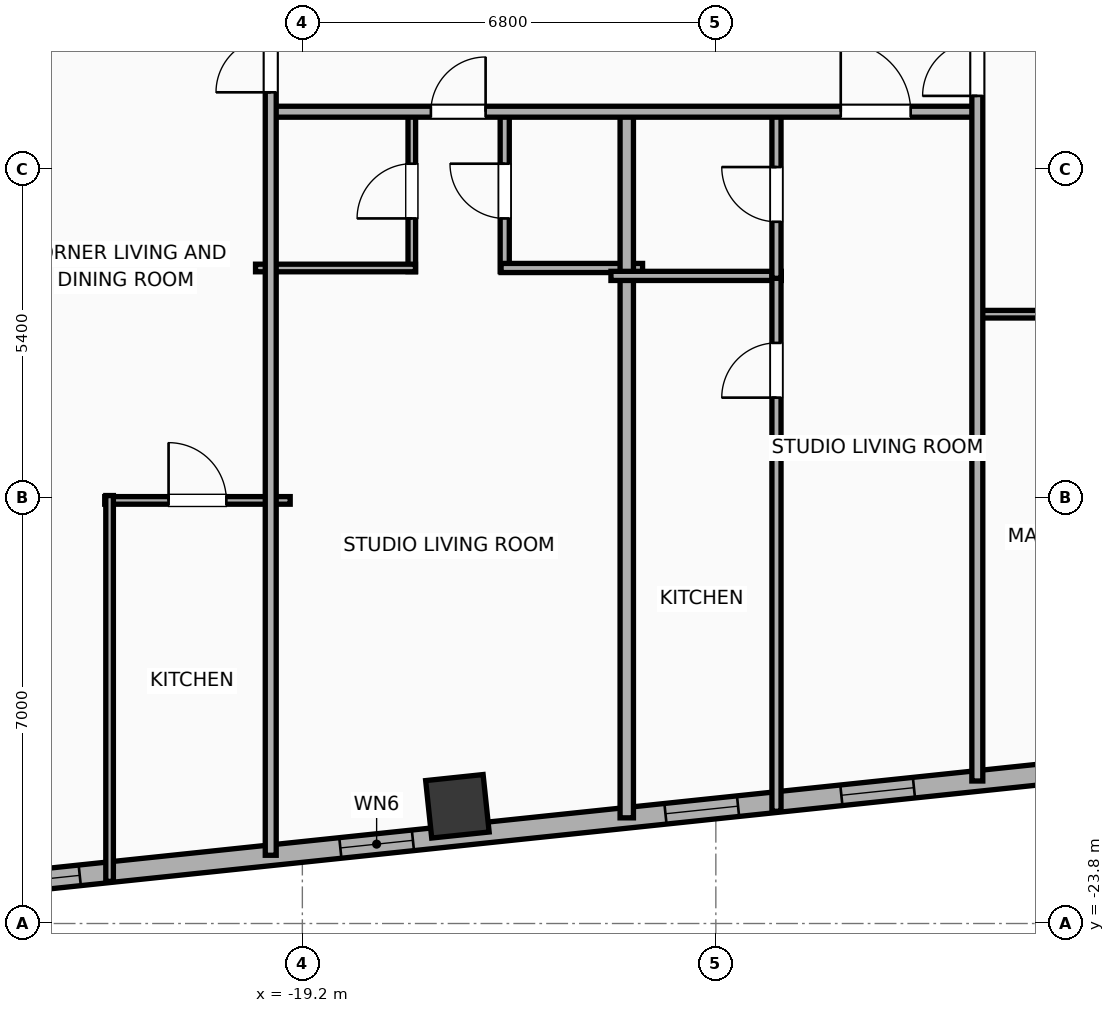
"""IFC4 building model, lengths in metres.
Left out: names, types, materials, properties, quantities, classifications, styles, units other than length and angle.
Written with IfcOpenShell. Run it as: python <this file> out.ifc"""

import sys

from ifc_helpers import new_model, si_unit, direction, frame, frame_2d, origin, origin_2d, place, context, subcontext, project, spatial, rectangle, hollow_rectangle, extrude, element, fill, save


model = new_model("IFC4")
c1 = context("Model", 3, precision=1e-05, world=origin(), true_north=direction((0.0, 1.0)))
c2 = subcontext(c1, "Body", "Model", "MODEL_VIEW")
j1 = project(units=[si_unit("LENGTHUNIT", "METRE"), si_unit("PLANEANGLEUNIT", "RADIAN")], contexts=[c1])
p1 = place(None, origin())
s1 = spatial("IfcSite", under=j1, at=p1, CompositionType="ELEMENT")
p2 = place(p1, origin())
s2 = spatial("IfcBuilding", under=s1, at=p2, CompositionType="ELEMENT")
p3 = place(p2, frame((0.0, 0.0, 163.8)))
s3 = spatial("IfcBuildingStorey", under=s2, at=p3, CompositionType="ELEMENT", Elevation=163.8)
p4 = place(p3, frame((-16.65, -21.873, 0.0), z_axis=(0.0, 0.0, 1.0), x_axis=(0.994521895368, 0.104528463268, 0.0)))
e1 = element("IfcColumn", 1, at=p4, inside=s3, PredefinedType="COLUMN", context=c2, shape_type="SweptSolid", body=[
    extrude(hollow_rectangle(XDim=0.95, YDim=0.95, WallThickness=0.032, at=origin_2d()), origin(), (0.0, 0.0, 1.0), 3.9),
])
p5 = place(p3, frame((24.756, -18.003, 0.0), z_axis=(0.0, 0.0, 1.0), x_axis=(-0.99452160744, -0.104531202687, 0.0)))
e2 = element("IfcWall", 2, at=p5, inside=s3, PredefinedType="ELEMENTEDWALL", context=c2, shape_type="SweptSolid", body=[
    extrude(rectangle(XDim=51.967, YDim=0.34, at=frame_2d((25.983, 0.0))), origin(), (0.0, 0.0, 1.0), 3.65),
])
p6 = place(p5, frame((25.633, 0.0, 0.75)))
e3 = element("IfcOpeningElement", 3, at=p6, cuts=e2, PredefinedType="OPENING", context=c2, shape_type="SweptSolid", body=[
    extrude(rectangle(XDim=2.4, YDim=2.1, at=frame_2d((1.2, 1.05))), frame((0.0, 0.18, 0.0), z_axis=(0.0, -1.0, 0.0), x_axis=(1.0, 0.0, 0.0)), (0.0, 0.0, 1.0), 0.36),
])
p7 = place(p5, frame((42.369, 0.0, 0.75)))
e4 = element("IfcOpeningElement", 4, at=p7, cuts=e2, PredefinedType="OPENING", context=c2, shape_type="SweptSolid", body=[
    extrude(rectangle(XDim=1.2, YDim=2.05, at=frame_2d((0.6, 1.025))), frame((0.0, 0.18, 0.0), z_axis=(0.0, -1.0, 0.0), x_axis=(1.0, 0.0, 0.0)), (0.0, 0.0, 1.0), 0.36),
])
p8 = place(p5, frame((34.085, 0.0, 0.75)))
e5 = element("IfcOpeningElement", 5, at=p8, cuts=e2, PredefinedType="OPENING", context=c2, shape_type="SweptSolid", body=[
    extrude(rectangle(XDim=1.2, YDim=2.05, at=frame_2d((0.6, 1.025))), frame((0.0, 0.18, 0.0), z_axis=(0.0, -1.0, 0.0), x_axis=(1.0, 0.0, 0.0)), (0.0, 0.0, 1.0), 0.36),
])
p9 = place(p5, frame((36.993, 0.0, 0.75)))
e6 = element("IfcOpeningElement", 6, at=p9, cuts=e2, PredefinedType="OPENING", context=c2, shape_type="SweptSolid", body=[
    extrude(rectangle(XDim=1.2, YDim=2.05, at=frame_2d((0.6, 1.025))), frame((0.0, 0.18, 0.0), z_axis=(0.0, -1.0, 0.0), x_axis=(1.0, 0.0, 0.0)), (0.0, 0.0, 1.0), 0.36),
])
p10 = place(p5, frame((14.397, 0.0, 0.75)))
e7 = element("IfcOpeningElement", 7, at=p10, cuts=e2, PredefinedType="OPENING", context=c2, shape_type="SweptSolid", body=[
    extrude(rectangle(XDim=1.2, YDim=2.05, at=frame_2d((0.6, 1.025))), frame((0.0, 0.18, 0.0), z_axis=(0.0, -1.0, 0.0), x_axis=(1.0, 0.0, 0.0)), (0.0, 0.0, 1.0), 0.36),
])
p11 = place(p5, frame((11.489, 0.0, 0.75)))
e8 = element("IfcOpeningElement", 8, at=p11, cuts=e2, PredefinedType="OPENING", context=c2, shape_type="SweptSolid", body=[
    extrude(rectangle(XDim=1.2, YDim=2.05, at=frame_2d((0.6, 1.025))), frame((0.0, 0.18, 0.0), z_axis=(0.0, -1.0, 0.0), x_axis=(1.0, 0.0, 0.0)), (0.0, 0.0, 1.0), 0.36),
])
p12 = place(p5, frame((8.521, 0.0, 0.75)))
e9 = element("IfcOpeningElement", 9, at=p12, cuts=e2, PredefinedType="OPENING", context=c2, shape_type="SweptSolid", body=[
    extrude(rectangle(XDim=1.2, YDim=2.05, at=frame_2d((0.6, 1.025))), frame((0.0, 0.18, 0.0), z_axis=(0.0, -1.0, 0.0), x_axis=(1.0, 0.0, 0.0)), (0.0, 0.0, 1.0), 0.36),
])
p13 = place(p5, frame((5.582, 0.0, 0.75)))
e10 = element("IfcOpeningElement", 10, at=p13, cuts=e2, PredefinedType="OPENING", context=c2, shape_type="SweptSolid", body=[
    extrude(rectangle(XDim=1.2, YDim=2.05, at=frame_2d((0.6, 1.025))), frame((0.0, 0.18, 0.0), z_axis=(0.0, -1.0, 0.0), x_axis=(1.0, 0.0, 0.0)), (0.0, 0.0, 1.0), 0.36),
])
p14 = place(p5, frame((29.313, 0.0, 0.75)))
e11 = element("IfcOpeningElement", 11, at=p14, cuts=e2, PredefinedType="OPENING", context=c2, shape_type="SweptSolid", body=[
    extrude(rectangle(XDim=1.2, YDim=2.05, at=frame_2d((0.6, 1.025))), frame((0.0, 0.18, 0.0), z_axis=(0.0, -1.0, 0.0), x_axis=(1.0, 0.0, 0.0)), (0.0, 0.0, 1.0), 0.36),
])
p15 = place(p5, frame((22.248, 0.0, 0.75)))
e12 = element("IfcOpeningElement", 12, at=p15, cuts=e2, PredefinedType="OPENING", context=c2, shape_type="SweptSolid", body=[
    extrude(rectangle(XDim=1.2, YDim=2.05, at=frame_2d((0.6, 1.025))), frame((0.0, 0.18, 0.0), z_axis=(0.0, -1.0, 0.0), x_axis=(1.0, 0.0, 0.0)), (0.0, 0.0, 1.0), 0.36),
])
p16 = place(p5, frame((18.186, 0.0, 0.75)))
e13 = element("IfcOpeningElement", 13, at=p16, cuts=e2, PredefinedType="OPENING", context=c2, shape_type="SweptSolid", body=[
    extrude(rectangle(XDim=1.2, YDim=2.05, at=frame_2d((0.6, 1.025))), frame((0.0, 0.18, 0.0), z_axis=(0.0, -1.0, 0.0), x_axis=(1.0, 0.0, 0.0)), (0.0, 0.0, 1.0), 0.36),
])
p17 = place(p5, frame((47.879, 0.0, 0.75)))
e14 = element("IfcOpeningElement", 14, at=p17, cuts=e2, PredefinedType="OPENING", context=c2, shape_type="SweptSolid", body=[
    extrude(rectangle(XDim=1.2, YDim=2.05, at=frame_2d((0.6, 1.025))), frame((0.0, 0.18, 0.0), z_axis=(0.0, -1.0, 0.0), x_axis=(1.0, 0.0, 0.0)), (0.0, 0.0, 1.0), 0.36),
])
p18 = place(p5, frame((49.844, 0.0, 0.75)))
e15 = element("IfcOpeningElement", 15, at=p18, cuts=e2, PredefinedType="OPENING", context=c2, shape_type="SweptSolid", body=[
    extrude(rectangle(XDim=1.2, YDim=2.05, at=frame_2d((0.6, 1.025))), frame((0.0, 0.18, 0.0), z_axis=(0.0, -1.0, 0.0), x_axis=(1.0, 0.0, 0.0)), (0.0, 0.0, 1.0), 0.36),
])
p19 = place(p3, frame((-17.4, -13.08, 0.0), z_axis=(0.0, 0.0, 1.0), x_axis=(0.0, 1.0, 0.0)))
e16 = element("IfcWall", 16, at=p19, inside=s3, PredefinedType="PARTITIONING", context=c2, shape_type="SweptSolid", body=[
    extrude(rectangle(XDim=2.65, YDim=0.125, at=frame_2d((1.325, 0.0))), origin(), (0.0, 0.0, 1.0), 3.65),
])
p20 = place(p19, frame((0.875, 0.0, 0.0)))
e17 = element("IfcOpeningElement", 17, at=p20, cuts=e16, PredefinedType="OPENING", context=c2, shape_type="SweptSolid", body=[
    extrude(rectangle(XDim=0.9, YDim=2.05, at=frame_2d((0.45, 1.025))), frame((0.0, 0.073, 0.0), z_axis=(0.0, -1.0, 0.0), x_axis=(1.0, 0.0, 0.0)), (0.0, 0.0, 1.0), 0.145),
])
p21 = place(p3, frame((-15.872, -13.08, 0.0), z_axis=(0.0, 0.0, 1.0), x_axis=(0.0, 1.0, 0.0)))
e18 = element("IfcWall", 18, at=p21, inside=s3, PredefinedType="PLUMBINGWALL", context=c2, shape_type="SweptSolid", body=[
    extrude(rectangle(XDim=2.65, YDim=0.15, at=frame_2d((1.325, 0.0))), origin(), (0.0, 0.0, 1.0), 3.04),
])
p22 = place(p21, frame((0.875, 0.0, 0.0)))
e19 = element("IfcOpeningElement", 19, at=p22, cuts=e18, PredefinedType="OPENING", context=c2, shape_type="SweptSolid", body=[
    extrude(rectangle(XDim=0.9, YDim=2.05, at=frame_2d((0.45, 1.025))), frame((0.0, 0.085, 0.0), z_axis=(0.0, -1.0, 0.0), x_axis=(1.0, 0.0, 0.0)), (0.0, 0.0, 1.0), 0.17),
])
p23 = place(p3, frame((-19.97, -13.02, 0.0), z_axis=(0.0, 0.0, 1.0), x_axis=(1.0, 0.0, 0.0)))
e20 = element("IfcWall", 20, at=p23, inside=s3, PredefinedType="PARTITIONING", context=c2, shape_type="SweptSolid", body=[
    extrude(rectangle(XDim=2.63, YDim=0.125, at=frame_2d((1.315, 0.0))), origin(), (0.0, 0.0, 1.0), 3.65),
])
p24 = place(p3, frame((-15.932, -13.02, 0.0), z_axis=(0.0, 0.0, 1.0), x_axis=(1.0, 0.0, 0.0)))
e21 = element("IfcWall", 21, at=p24, inside=s3, PredefinedType="PLUMBINGWALL", context=c2, shape_type="SweptSolid", body=[
    extrude(rectangle(XDim=2.327, YDim=0.15, at=frame_2d((1.164, 0.0))), origin(), (0.0, 0.0, 1.0), 3.65),
])
p25 = place(p3, frame((-13.865, -22.062, 0.0), z_axis=(0.0, 0.0, 1.0), x_axis=(0.0, 1.0, 0.0)))
e22 = element("IfcWall", 22, at=p25, inside=s3, PredefinedType="PARTITIONING", context=c2, shape_type="SweptSolid", body=[
    extrude(rectangle(XDim=11.692, YDim=0.22, at=frame_2d((5.846, 0.0))), origin(), (0.0, 0.0, 1.0), 3.65),
])
p26 = place(p3, frame((-14.125, -13.15, 0.0), z_axis=(0.0, 0.0, 1.0), x_axis=(1.0, 0.0, 0.0)))
e23 = element("IfcWall", 23, at=p26, inside=s3, PredefinedType="PLUMBINGWALL", context=c2, shape_type="SweptSolid", body=[
    extrude(rectangle(XDim=2.802, YDim=0.15, at=frame_2d((1.401, 0.0))), origin(), (0.0, 0.0, 1.0), 3.65),
])
p27 = place(p3, frame((-11.403, -21.954, 0.0), z_axis=(0.0, 0.0, 1.0), x_axis=(0.0, 1.0, 0.0)))
e24 = element("IfcWall", 24, at=p27, inside=s3, PredefinedType="PLUMBINGWALL", context=c2, shape_type="SweptSolid", body=[
    extrude(rectangle(XDim=8.844, YDim=0.15, at=frame_2d((4.422, 0.0))), origin(), (0.0, 0.0, 1.0), 3.65),
])
p28 = place(p27, frame((6.802, 0.0, 0.0)))
e25 = element("IfcOpeningElement", 25, at=p28, cuts=e24, PredefinedType="OPENING", context=c2, shape_type="SweptSolid", body=[
    extrude(rectangle(XDim=0.9, YDim=2.05, at=frame_2d((0.45, 1.025))), frame((0.0, 0.085, 0.0), z_axis=(0.0, -1.0, 0.0), x_axis=(1.0, 0.0, 0.0)), (0.0, 0.0, 1.0), 0.17),
])
p29 = place(p3, frame((-11.403, -13.19, 0.0), z_axis=(0.0, 0.0, 1.0), x_axis=(0.0, 1.0, 0.0)))
e26 = element("IfcWall", 26, at=p29, inside=s3, PredefinedType="PLUMBINGWALL", context=c2, shape_type="SweptSolid", body=[
    extrude(rectangle(XDim=2.76, YDim=0.15, at=frame_2d((1.38, 0.0))), origin(), (0.0, 0.0, 1.0), 3.65),
])
p30 = place(p29, frame((0.93, 0.0, 0.0)))
e27 = element("IfcOpeningElement", 27, at=p30, cuts=e26, PredefinedType="OPENING", context=c2, shape_type="SweptSolid", body=[
    extrude(rectangle(XDim=0.9, YDim=2.05, at=frame_2d((0.45, 1.025))), frame((0.0, 0.085, 0.0), z_axis=(0.0, -1.0, 0.0), x_axis=(1.0, 0.0, 0.0)), (0.0, 0.0, 1.0), 0.17),
])
p31 = place(p3, frame((-19.75, -10.45, 0.0), z_axis=(0.0, 0.0, 1.0), x_axis=(1.0, 0.0, 0.0)))
e28 = element("IfcWall", 28, at=p31, inside=s3, PredefinedType="PARTITIONING", context=c2, shape_type="SweptSolid", body=[
    extrude(rectangle(XDim=11.67, YDim=0.18, at=frame_2d((5.835, 0.0))), origin(), (0.0, 0.0, 1.0), 3.65),
])
p32 = place(p31, frame((2.664, 0.0, 0.0)))
e29 = element("IfcOpeningElement", 29, at=p32, cuts=e28, PredefinedType="OPENING", context=c2, shape_type="SweptSolid", body=[
    extrude(rectangle(XDim=0.9, YDim=2.05, at=frame_2d((0.45, 1.025))), frame((0.0, 0.1, 0.0), z_axis=(0.0, -1.0, 0.0), x_axis=(1.0, 0.0, 0.0)), (0.0, 0.0, 1.0), 0.2),
])
p33 = place(p31, frame((9.404, 0.0, 0.0)))
e30 = element("IfcOpeningElement", 30, at=p33, cuts=e28, PredefinedType="OPENING", context=c2, shape_type="SweptSolid", body=[
    extrude(rectangle(XDim=1.15, YDim=2.05, at=frame_2d((0.575, 1.025))), frame((0.0, 0.1, 0.0), z_axis=(0.0, -1.0, 0.0), x_axis=(1.0, 0.0, 0.0)), (0.0, 0.0, 1.0), 0.2),
])
p34 = place(p3, frame((-8.08, -13.78, 0.0), z_axis=(0.0, 0.0, 1.0), x_axis=(1.0, 0.0, 0.0)))
e31 = element("IfcWall", 31, at=p34, inside=s3, PredefinedType="PARTITIONING", context=c2, shape_type="SweptSolid", body=[
    extrude(rectangle(XDim=8.06, YDim=0.125, at=frame_2d((4.03, 0.0))), origin(), (0.0, 0.0, 1.0), 3.65),
])
p35 = place(p34, frame((1.323, 0.0, 0.0)))
e32 = element("IfcOpeningElement", 32, at=p35, cuts=e31, PredefinedType="OPENING", context=c2, shape_type="SweptSolid", body=[
    extrude(rectangle(XDim=0.9, YDim=2.05, at=frame_2d((0.45, 1.025))), frame((0.0, 0.073, 0.0), z_axis=(0.0, -1.0, 0.0), x_axis=(1.0, 0.0, 0.0)), (0.0, 0.0, 1.0), 0.145),
])
p36 = place(p34, frame((4.547, 0.0, 0.0)))
e33 = element("IfcOpeningElement", 33, at=p36, cuts=e31, PredefinedType="OPENING", context=c2, shape_type="SweptSolid", body=[
    extrude(rectangle(XDim=0.9, YDim=2.05, at=frame_2d((0.45, 1.025))), frame((0.0, 0.073, 0.0), z_axis=(0.0, -1.0, 0.0), x_axis=(1.0, 0.0, 0.0)), (0.0, 0.0, 1.0), 0.145),
])
p37 = place(p3, frame((-8.1, -21.456, 0.0), z_axis=(0.0, 0.0, 1.0), x_axis=(0.0, 1.0, 0.0)))
e34 = element("IfcWall", 34, at=p37, inside=s3, PredefinedType="PARTITIONING", context=c2, shape_type="SweptSolid", body=[
    extrude(rectangle(XDim=12.516, YDim=0.18, at=frame_2d((6.258, 0.0))), origin(), (0.0, 0.0, 1.0), 3.65),
])
p38 = place(p37, frame((11.267, 0.0, 0.0)))
e35 = element("IfcOpeningElement", 35, at=p38, cuts=e34, PredefinedType="OPENING", context=c2, shape_type="SweptSolid", body=[
    extrude(rectangle(XDim=0.9, YDim=2.05, at=frame_2d((0.45, 1.025))), frame((0.0, 0.1, 0.0), z_axis=(0.0, -1.0, 0.0), x_axis=(1.0, 0.0, 0.0)), (0.0, 0.0, 1.0), 0.2),
])
p39 = place(p3, frame((-22.45, -16.842, 0.0), z_axis=(0.0, 0.0, 1.0), x_axis=(1.0, 0.0, 0.0)))
e36 = element("IfcWall", 36, at=p39, inside=s3, PredefinedType="PARTITIONING", context=c2, shape_type="SweptSolid", body=[
    extrude(rectangle(XDim=3.05, YDim=0.125, at=frame_2d((1.525, 0.0))), origin(), (0.0, 0.0, 1.0), 3.65),
])
p40 = place(p39, frame((1.05, 0.0, 0.0)))
e37 = element("IfcOpeningElement", 37, at=p40, cuts=e36, PredefinedType="OPENING", context=c2, shape_type="SweptSolid", body=[
    extrude(rectangle(XDim=0.95, YDim=2.05, at=frame_2d((0.475, 1.025))), frame((0.0, 0.073, 0.0), z_axis=(0.0, -1.0, 0.0), x_axis=(1.0, 0.0, 0.0)), (0.0, 0.0, 1.0), 0.145),
])
p41 = place(p3, frame((-22.37, -23.107, 0.0), z_axis=(0.0, 0.0, 1.0), x_axis=(0.0, 1.0, 0.0)))
e38 = element("IfcWall", 38, at=p41, inside=s3, PredefinedType="PARTITIONING", context=c2, shape_type="SweptSolid", body=[
    extrude(rectangle(XDim=6.345, YDim=0.125, at=frame_2d((3.173, 0.0))), origin(), (0.0, 0.0, 1.0), 3.65),
])
p42 = place(p3, frame((-19.72, -22.678, 0.0), z_axis=(0.0, 0.0, 1.0), x_axis=(0.0, 1.0, 0.0)))
e39 = element("IfcWall", 39, at=p42, inside=s3, PredefinedType="PARTITIONING", context=c2, shape_type="SweptSolid", body=[
    extrude(rectangle(XDim=21.178, YDim=0.18, at=frame_2d((10.589, 0.0))), origin(), (0.0, 0.0, 1.0), 3.65),
])
p43 = place(p42, frame((12.547, 0.0, 0.0)))
e40 = element("IfcOpeningElement", 40, at=p43, cuts=e39, PredefinedType="OPENING", context=c2, shape_type="SweptSolid", body=[
    extrude(rectangle(XDim=0.9, YDim=2.05, at=frame_2d((0.45, 1.025))), frame((0.0, 0.1, 0.0), z_axis=(0.0, -1.0, 0.0), x_axis=(1.0, 0.0, 0.0)), (0.0, 0.0, 1.0), 0.2),
])
p44 = place(p7, origin())
e41 = element("IfcWindow", 41, at=p44, inside=s3, PartitioningType="SINGLE_PANEL", PredefinedType="WINDOW", context=c2, shape_type="SweptSolid", body=[
    extrude(rectangle(XDim=1.2, YDim=2.05, at=frame_2d((0.6, 1.025))), frame((0.0, 0.03, 0.0), z_axis=(0.0, -1.0, 0.0), x_axis=(1.0, 0.0, 0.0)), (0.0, 0.0, 1.0), 0.06),
])
fill(e4, e41)
p45 = place(p8, origin())
e42 = element("IfcWindow", 42, at=p45, inside=s3, PartitioningType="SINGLE_PANEL", PredefinedType="WINDOW", context=c2, shape_type="SweptSolid", body=[
    extrude(rectangle(XDim=1.2, YDim=2.05, at=frame_2d((0.6, 1.025))), frame((0.0, 0.03, 0.0), z_axis=(0.0, -1.0, 0.0), x_axis=(1.0, 0.0, 0.0)), (0.0, 0.0, 1.0), 0.06),
])
fill(e5, e42)
p46 = place(p9, origin())
e43 = element("IfcWindow", 43, at=p46, inside=s3, PartitioningType="SINGLE_PANEL", PredefinedType="WINDOW", context=c2, shape_type="SweptSolid", body=[
    extrude(rectangle(XDim=1.2, YDim=2.05, at=frame_2d((0.6, 1.025))), frame((0.0, 0.03, 0.0), z_axis=(0.0, -1.0, 0.0), x_axis=(1.0, 0.0, 0.0)), (0.0, 0.0, 1.0), 0.06),
])
fill(e6, e43)
p47 = place(p17, origin())
e44 = element("IfcWindow", 44, at=p47, inside=s3, PartitioningType="SINGLE_PANEL", PredefinedType="WINDOW", context=c2, shape_type="SweptSolid", body=[
    extrude(rectangle(XDim=1.2, YDim=2.05, at=frame_2d((0.6, 1.025))), frame((0.0, 0.03, 0.0), z_axis=(0.0, -1.0, 0.0), x_axis=(1.0, 0.0, 0.0)), (0.0, 0.0, 1.0), 0.06),
])
fill(e14, e44)
p48 = place(p20, origin())
e45 = element("IfcDoor", 45, at=p48, inside=s3, OperationType="SINGLE_SWING_LEFT", PredefinedType="DOOR", context=c2, shape_type="SweptSolid", body=[
    extrude(rectangle(XDim=0.9, YDim=2.05, at=frame_2d((0.45, 1.025))), frame((0.0, 0.025, 0.0), z_axis=(0.0, -1.0, 0.0), x_axis=(1.0, 0.0, 0.0)), (0.0, 0.0, 1.0), 0.05),
])
fill(e17, e45)
p49 = place(p22, origin())
e46 = element("IfcDoor", 46, at=p49, inside=s3, OperationType="SINGLE_SWING_RIGHT", PredefinedType="DOOR", context=c2, shape_type="SweptSolid", body=[
    extrude(rectangle(XDim=0.9, YDim=2.05, at=frame_2d((0.45, 1.025))), frame((0.0, 0.025, 0.0), z_axis=(0.0, -1.0, 0.0), x_axis=(1.0, 0.0, 0.0)), (0.0, 0.0, 1.0), 0.05),
])
fill(e19, e46)
p50 = place(p28, origin())
e47 = element("IfcDoor", 47, at=p50, inside=s3, OperationType="SINGLE_SWING_LEFT", PredefinedType="DOOR", context=c2, shape_type="SweptSolid", body=[
    extrude(rectangle(XDim=0.9, YDim=2.05, at=frame_2d((0.45, 1.025))), frame((0.0, 0.025, 0.0), z_axis=(0.0, -1.0, 0.0), x_axis=(1.0, 0.0, 0.0)), (0.0, 0.0, 1.0), 0.05),
])
fill(e25, e47)
p51 = place(p30, origin())
e48 = element("IfcDoor", 48, at=p51, inside=s3, OperationType="SINGLE_SWING_RIGHT", PredefinedType="DOOR", context=c2, shape_type="SweptSolid", body=[
    extrude(rectangle(XDim=0.9, YDim=2.05, at=frame_2d((0.45, 1.025))), frame((0.0, 0.025, 0.0), z_axis=(0.0, -1.0, 0.0), x_axis=(1.0, 0.0, 0.0)), (0.0, 0.0, 1.0), 0.05),
])
fill(e27, e48)
p52 = place(p32, origin())
e49 = element("IfcDoor", 49, at=p52, inside=s3, OperationType="SINGLE_SWING_RIGHT", PredefinedType="DOOR", context=c2, shape_type="SweptSolid", body=[
    extrude(rectangle(XDim=0.9, YDim=2.05, at=frame_2d((0.45, 1.025))), frame((0.0, 0.025, 0.0), z_axis=(0.0, -1.0, 0.0), x_axis=(1.0, 0.0, 0.0)), (0.0, 0.0, 1.0), 0.05),
])
fill(e29, e49)
p53 = place(p33, origin())
e50 = element("IfcDoor", 50, at=p53, inside=s3, OperationType="SINGLE_SWING_LEFT", PredefinedType="DOOR", context=c2, shape_type="SweptSolid", body=[
    extrude(rectangle(XDim=1.15, YDim=2.05, at=frame_2d((0.575, 1.025))), frame((0.0, 0.025, 0.0), z_axis=(0.0, -1.0, 0.0), x_axis=(1.0, 0.0, 0.0)), (0.0, 0.0, 1.0), 0.05),
])
fill(e30, e50)
p54 = place(p38, origin())
e51 = element("IfcDoor", 51, at=p54, inside=s3, OperationType="SINGLE_SWING_LEFT", PredefinedType="DOOR", context=c2, shape_type="SweptSolid", body=[
    extrude(rectangle(XDim=0.9, YDim=2.05, at=frame_2d((0.45, 1.025))), frame((0.0, 0.025, 0.0), z_axis=(0.0, -1.0, 0.0), x_axis=(1.0, 0.0, 0.0)), (0.0, 0.0, 1.0), 0.05),
])
fill(e35, e51)
p55 = place(p40, origin())
e52 = element("IfcDoor", 52, at=p55, inside=s3, OperationType="SINGLE_SWING_LEFT", PredefinedType="DOOR", context=c2, shape_type="SweptSolid", body=[
    extrude(rectangle(XDim=0.95, YDim=2.05, at=frame_2d((0.475, 1.025))), frame((0.0, 0.025, 0.0), z_axis=(0.0, -1.0, 0.0), x_axis=(1.0, 0.0, 0.0)), (0.0, 0.0, 1.0), 0.05),
])
fill(e37, e52)
p56 = place(p43, origin())
e53 = element("IfcDoor", 53, at=p56, inside=s3, OperationType="SINGLE_SWING_LEFT", PredefinedType="DOOR", context=c2, shape_type="SweptSolid", body=[
    extrude(rectangle(XDim=0.9, YDim=2.05, at=frame_2d((0.45, 1.025))), frame((0.0, 0.025, 0.0), z_axis=(0.0, -1.0, 0.0), x_axis=(1.0, 0.0, 0.0)), (0.0, 0.0, 1.0), 0.05),
])
fill(e40, e53)
save(model, sys.argv[1])
